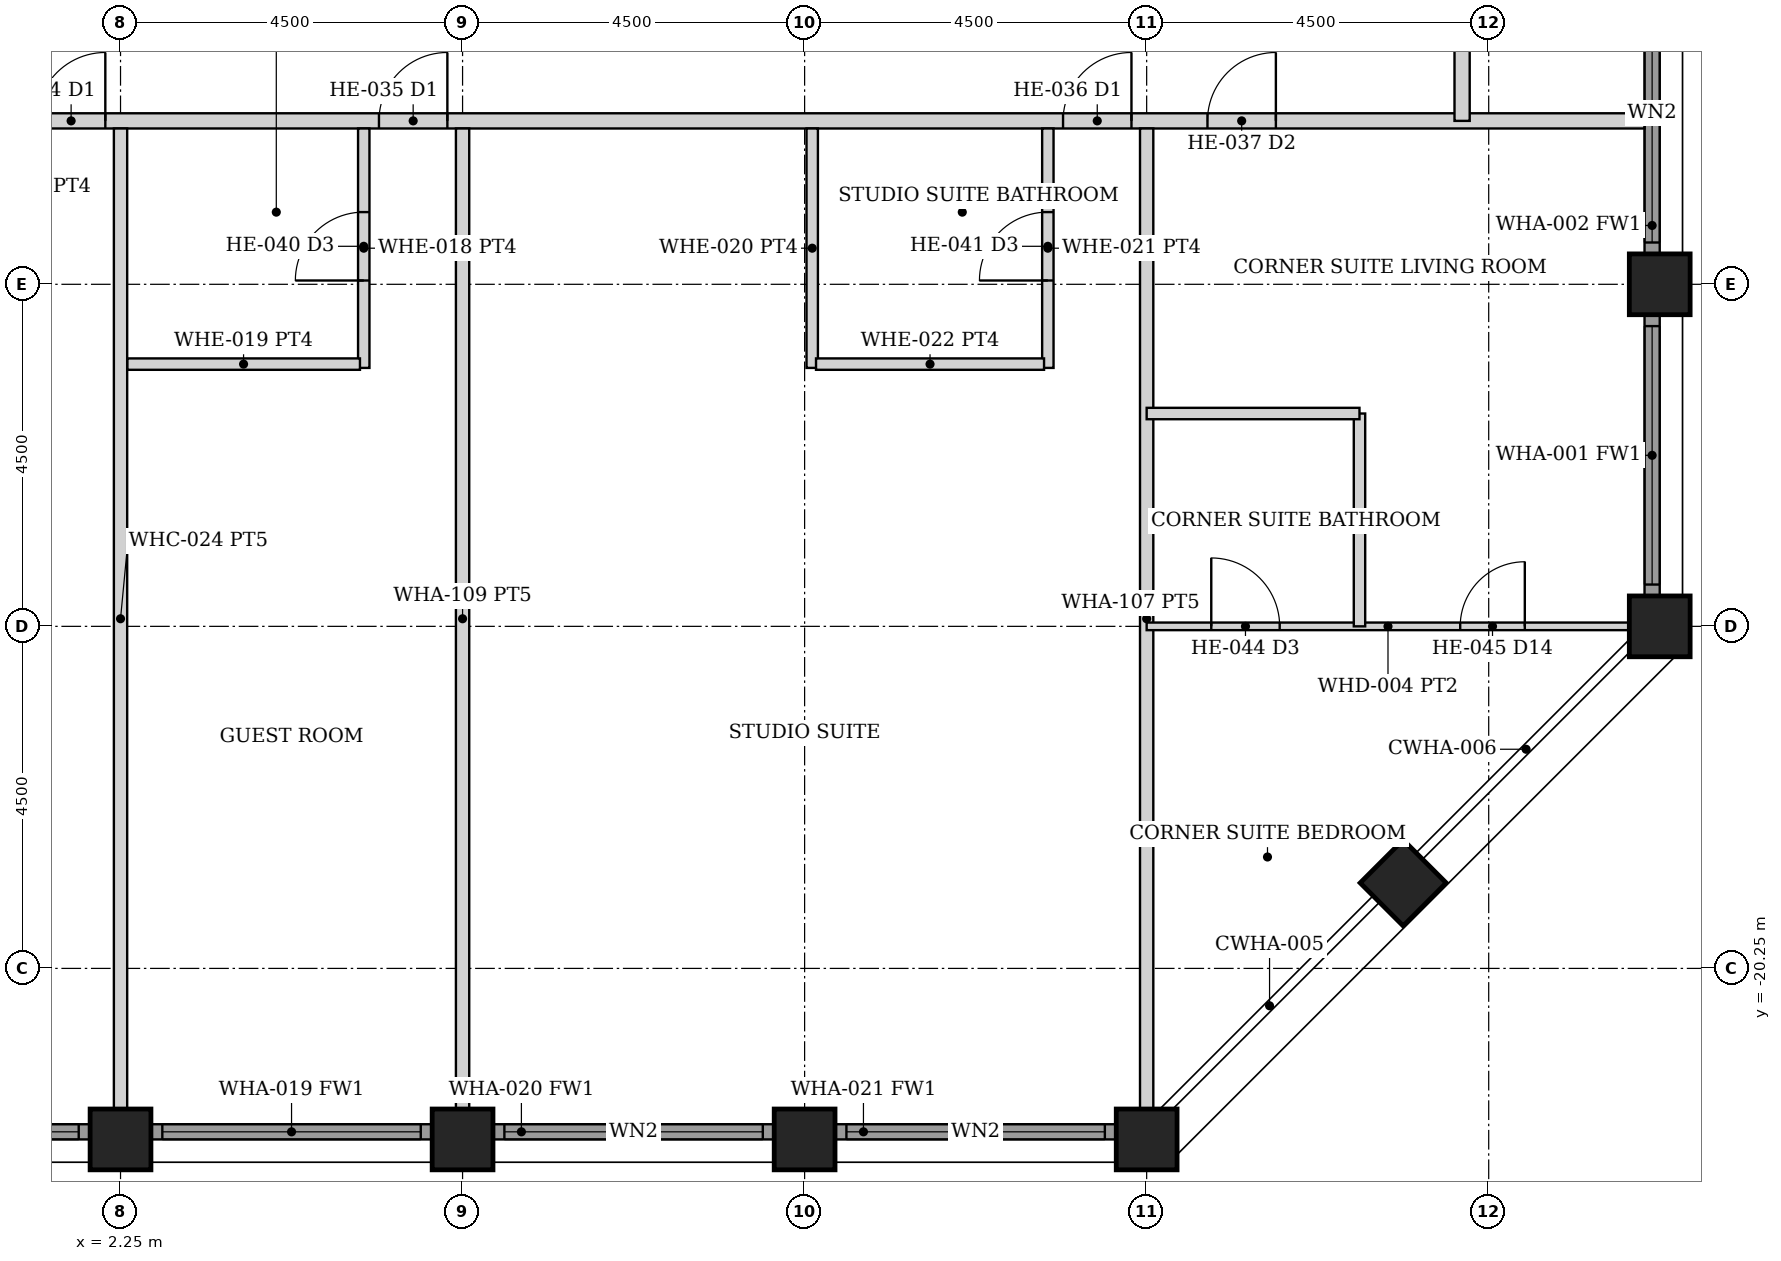
"""IFC4 building model, lengths in metres.
Left out: names, types, materials, properties, quantities, classifications, styles, units other than length and angle.
Written with IfcOpenShell. Run it as: python <this file> out.ifc"""

import sys

from ifc_helpers import new_model, si_unit, direction, frame, frame_2d, origin, origin_2d, place, context, subcontext, project, spatial, rectangle, hollow_rectangle, extrude, element, fill, save


model = new_model("IFC4")
c1 = context("Model", 3, precision=1e-05, world=origin(), true_north=direction((0.0, 1.0)))
c2 = subcontext(c1, "Body", "Model", "MODEL_VIEW")
j1 = project(units=[si_unit("LENGTHUNIT", "METRE"), si_unit("PLANEANGLEUNIT", "RADIAN")], contexts=[c1])
p1 = place(None, origin())
s1 = spatial("IfcSite", under=j1, at=p1, CompositionType="ELEMENT")
p2 = place(p1, origin())
s2 = spatial("IfcBuilding", under=s1, at=p2, CompositionType="ELEMENT")
p3 = place(p2, frame((0.0, 0.0, 161.6)))
s3 = spatial("IfcBuildingStorey", under=s2, at=p3, CompositionType="ELEMENT", Elevation=161.6)
for number, where, z_axis, x_axis in (
    (1, (22.5, -15.75, 0.0), (0.0, 0.0, 1.0), (1.0, 0.0, 0.0)),
    (2, (22.5, -11.25, 0.0), (0.0, 0.0, 1.0), (1.0, 0.0, 0.0)),
    (3, (2.25, -22.5, 0.0), (0.0, 0.0, 1.0), (0.0, 1.0, 0.0)),
    (4, (6.75, -22.5, 0.0), (0.0, 0.0, 1.0), (0.0, 1.0, 0.0)),
    (5, (11.25, -22.5, 0.0), (0.0, 0.0, 1.0), (0.0, 1.0, 0.0)),
    (6, (15.75, -22.5, 0.0), (0.0, 0.0, 1.0), (0.0, 1.0, 0.0)),
    (7, (19.125, -19.125, 0.0), (0.0, 0.0, 1.0), (0.707, -0.707, 0.0)),
):
    element("IfcColumn", number, at=place(p3, frame(where, z_axis=z_axis, x_axis=x_axis)), inside=s3, PredefinedType="COLUMN", context=c2, shape_type="SweptSolid", body=[
        extrude(hollow_rectangle(XDim=0.8, YDim=0.8, WallThickness=0.05, at=origin_2d()), origin(), (0.0, 0.0, 1.0), 3.6),
    ])
p4 = place(p3, frame((-1.845, -22.4, 0.0), z_axis=(0.0, 0.0, 1.0), x_axis=(1.0, 0.0, 0.0)))
e8 = element("IfcWall", 8, at=p4, inside=s3, PredefinedType="SOLIDWALL", context=c2, shape_type="SweptSolid", body=[
    extrude(rectangle(XDim=3.69, YDim=0.2, at=frame_2d((1.845, 0.0))), origin(), (0.0, 0.0, 1.0), 2.479),
])
p5 = place(p4, frame((0.145, 0.0, 0.3)))
e9 = element("IfcOpeningElement", 9, at=p5, cuts=e8, PredefinedType="OPENING", context=c2, shape_type="SweptSolid", body=[
    extrude(rectangle(XDim=3.4, YDim=2.029, at=frame_2d((1.7, 1.015))), frame((0.0, 0.11, 0.0), z_axis=(0.0, -1.0, 0.0), x_axis=(1.0, 0.0, 0.0)), (0.0, 0.0, 1.0), 0.22),
])
p6 = place(p3, frame((2.655, -22.4, 0.0), z_axis=(0.0, 0.0, 1.0), x_axis=(1.0, 0.0, 0.0)))
e10 = element("IfcWall", 10, at=p6, inside=s3, PredefinedType="SOLIDWALL", context=c2, shape_type="SweptSolid", body=[
    extrude(rectangle(XDim=3.69, YDim=0.2, at=frame_2d((1.845, 0.0))), origin(), (0.0, 0.0, 1.0), 2.479),
])
p7 = place(p6, frame((0.145, 0.0, 0.3)))
e11 = element("IfcOpeningElement", 11, at=p7, cuts=e10, PredefinedType="OPENING", context=c2, shape_type="SweptSolid", body=[
    extrude(rectangle(XDim=3.4, YDim=2.029, at=frame_2d((1.7, 1.015))), frame((0.0, 0.11, 0.0), z_axis=(0.0, -1.0, 0.0), x_axis=(1.0, 0.0, 0.0)), (0.0, 0.0, 1.0), 0.22),
])
p8 = place(p3, frame((7.155, -22.4, 0.0), z_axis=(0.0, 0.0, 1.0), x_axis=(1.0, 0.0, 0.0)))
e12 = element("IfcWall", 12, at=p8, inside=s3, PredefinedType="SOLIDWALL", context=c2, shape_type="SweptSolid", body=[
    extrude(rectangle(XDim=3.69, YDim=0.2, at=frame_2d((1.845, 0.0))), origin(), (0.0, 0.0, 1.0), 2.479),
])
p9 = place(p8, frame((0.145, 0.0, 0.3)))
e13 = element("IfcOpeningElement", 13, at=p9, cuts=e12, PredefinedType="OPENING", context=c2, shape_type="SweptSolid", body=[
    extrude(rectangle(XDim=3.4, YDim=2.029, at=frame_2d((1.7, 1.015))), frame((0.0, 0.11, 0.0), z_axis=(0.0, -1.0, 0.0), x_axis=(1.0, 0.0, 0.0)), (0.0, 0.0, 1.0), 0.22),
])
p10 = place(p3, frame((11.655, -22.4, 0.0), z_axis=(0.0, 0.0, 1.0), x_axis=(1.0, 0.0, 0.0)))
e14 = element("IfcWall", 14, at=p10, inside=s3, PredefinedType="SOLIDWALL", context=c2, shape_type="SweptSolid", body=[
    extrude(rectangle(XDim=3.69, YDim=0.2, at=frame_2d((1.845, 0.0))), origin(), (0.0, 0.0, 1.0), 2.479),
])
p11 = place(p10, frame((0.145, 0.0, 0.3)))
e15 = element("IfcOpeningElement", 15, at=p11, cuts=e14, PredefinedType="OPENING", context=c2, shape_type="SweptSolid", body=[
    extrude(rectangle(XDim=3.4, YDim=2.029, at=frame_2d((1.7, 1.015))), frame((0.0, 0.11, 0.0), z_axis=(0.0, -1.0, 0.0), x_axis=(1.0, 0.0, 0.0)), (0.0, 0.0, 1.0), 0.22),
])
p12 = place(p3, frame((22.4, -15.345, 0.0), z_axis=(0.0, 0.0, 1.0), x_axis=(0.0, 1.0, 0.0)))
e16 = element("IfcWall", 16, at=p12, inside=s3, PredefinedType="SOLIDWALL", context=c2, shape_type="SweptSolid", body=[
    extrude(rectangle(XDim=3.69, YDim=0.2, at=frame_2d((1.845, 0.0))), origin(), (0.0, 0.0, 1.0), 2.479),
])
p13 = place(p12, frame((0.145, 0.0, 0.3)))
e17 = element("IfcOpeningElement", 17, at=p13, cuts=e16, PredefinedType="OPENING", context=c2, shape_type="SweptSolid", body=[
    extrude(rectangle(XDim=3.4, YDim=2.029, at=frame_2d((1.7, 1.015))), frame((0.0, 0.11, 0.0), z_axis=(0.0, -1.0, 0.0), x_axis=(1.0, 0.0, 0.0)), (0.0, 0.0, 1.0), 0.22),
])
p14 = place(p3, frame((22.4, -10.845, 0.0), z_axis=(0.0, 0.0, 1.0), x_axis=(0.0, 1.0, 0.0)))
e18 = element("IfcWall", 18, at=p14, inside=s3, PredefinedType="SOLIDWALL", context=c2, shape_type="SweptSolid", body=[
    extrude(rectangle(XDim=3.69, YDim=0.2, at=frame_2d((1.845, 0.0))), origin(), (0.0, 0.0, 1.0), 2.479),
])
p15 = place(p14, frame((0.145, 0.0, 0.3)))
e19 = element("IfcOpeningElement", 19, at=p15, cuts=e18, PredefinedType="OPENING", context=c2, shape_type="SweptSolid", body=[
    extrude(rectangle(XDim=3.4, YDim=2.029, at=frame_2d((1.7, 1.015))), frame((0.0, 0.11, 0.0), z_axis=(0.0, -1.0, 0.0), x_axis=(1.0, 0.0, 0.0)), (0.0, 0.0, 1.0), 0.22),
])
p16 = place(p3, frame((-22.3, -9.1, 0.0), z_axis=(0.0, 0.0, 1.0), x_axis=(1.0, 0.0, 0.0)))
e20 = element("IfcWall", 20, at=p16, inside=s3, PredefinedType="PARTITIONING", context=c2, shape_type="SweptSolid", body=[
    extrude(rectangle(XDim=44.6, YDim=0.2, at=frame_2d((22.3, 0.0))), origin(), (0.0, 0.0, 1.0), 2.473),
])
p17 = place(p16, frame((6.75, 0.0, 0.0)))
e21 = element("IfcOpeningElement", 21, at=p17, cuts=e20, PredefinedType="OPENING", context=c2, shape_type="SweptSolid", body=[
    extrude(rectangle(XDim=0.9, YDim=2.1, at=frame_2d((0.45, 1.05))), frame((0.0, 0.11, 0.0), z_axis=(0.0, -1.0, 0.0), x_axis=(1.0, 0.0, 0.0)), (0.0, 0.0, 1.0), 0.22),
])
p18 = place(p16, frame((23.45, 0.0, 0.0)))
e22 = element("IfcOpeningElement", 22, at=p18, cuts=e20, PredefinedType="OPENING", context=c2, shape_type="SweptSolid", body=[
    extrude(rectangle(XDim=0.9, YDim=2.1, at=frame_2d((0.45, 1.05))), frame((0.0, 0.11, 0.0), z_axis=(0.0, -1.0, 0.0), x_axis=(1.0, 0.0, 0.0)), (0.0, 0.0, 1.0), 0.22),
])
p19 = place(p16, frame((27.95, 0.0, 0.0)))
e23 = element("IfcOpeningElement", 23, at=p19, cuts=e20, PredefinedType="OPENING", context=c2, shape_type="SweptSolid", body=[
    extrude(rectangle(XDim=0.9, YDim=2.1, at=frame_2d((0.45, 1.05))), frame((0.0, 0.11, 0.0), z_axis=(0.0, -1.0, 0.0), x_axis=(1.0, 0.0, 0.0)), (0.0, 0.0, 1.0), 0.22),
])
p20 = place(p16, frame((36.95, 0.0, 0.0)))
e24 = element("IfcOpeningElement", 24, at=p20, cuts=e20, PredefinedType="OPENING", context=c2, shape_type="SweptSolid", body=[
    extrude(rectangle(XDim=0.9, YDim=2.1, at=frame_2d((0.45, 1.05))), frame((0.0, 0.11, 0.0), z_axis=(0.0, -1.0, 0.0), x_axis=(1.0, 0.0, 0.0)), (0.0, 0.0, 1.0), 0.22),
])
p21 = place(p16, frame((38.85, 0.0, 0.0)))
e25 = element("IfcOpeningElement", 25, at=p21, cuts=e20, PredefinedType="OPENING", context=c2, shape_type="SweptSolid", body=[
    extrude(rectangle(XDim=0.9, YDim=2.1, at=frame_2d((0.45, 1.05))), frame((0.0, 0.11, 0.0), z_axis=(0.0, -1.0, 0.0), x_axis=(1.0, 0.0, 0.0)), (0.0, 0.0, 1.0), 0.22),
])
p22 = place(p16, frame((4.85, 0.0, 0.0)))
e26 = element("IfcOpeningElement", 26, at=p22, cuts=e20, PredefinedType="OPENING", context=c2, shape_type="SweptSolid", body=[
    extrude(rectangle(XDim=0.9, YDim=2.1, at=frame_2d((0.45, 1.05))), frame((0.0, 0.11, 0.0), z_axis=(0.0, -1.0, 0.0), x_axis=(1.0, 0.0, 0.0)), (0.0, 0.0, 1.0), 0.22),
])
p23 = place(p3, frame((19.9, -9.1, 0.0), z_axis=(0.0, 0.0, 1.0), x_axis=(0.0, 1.0, 0.0)))
e27 = element("IfcWall", 27, at=p23, inside=s3, PredefinedType="PARTITIONING", context=c2, shape_type="SweptSolid", body=[
    extrude(rectangle(XDim=18.2, YDim=0.2, at=frame_2d((9.1, 0.0))), origin(), (0.0, 0.0, 1.0), 2.473),
])
p24 = place(p23, frame((8.425, 0.0, 0.0)))
e28 = element("IfcOpeningElement", 28, at=p24, cuts=e27, PredefinedType="OPENING", context=c2, shape_type="SweptSolid", body=[
    extrude(rectangle(XDim=1.35, YDim=2.1, at=frame_2d((0.675, 1.05))), frame((0.0, 0.11, 0.0), z_axis=(0.0, -1.0, 0.0), x_axis=(1.0, 0.0, 0.0)), (0.0, 0.0, 1.0), 0.22),
])
p25 = place(p3, frame((5.45, -12.35, 0.0), z_axis=(0.0, 0.0, 1.0), x_axis=(0.0, 1.0, 0.0)))
e29 = element("IfcWall", 29, at=p25, inside=s3, PredefinedType="PARTITIONING", context=c2, shape_type="SweptSolid", body=[
    extrude(rectangle(XDim=3.15, YDim=0.15, at=frame_2d((1.575, 0.0))), origin(), (0.0, 0.0, 1.0), 2.473),
])
p26 = place(p25, frame((1.15, 0.0, 0.0)))
e30 = element("IfcOpeningElement", 30, at=p26, cuts=e29, PredefinedType="OPENING", context=c2, shape_type="SweptSolid", body=[
    extrude(rectangle(XDim=0.9, YDim=2.1, at=frame_2d((0.45, 1.05))), frame((0.0, 0.085, 0.0), z_axis=(0.0, -1.0, 0.0), x_axis=(1.0, 0.0, 0.0)), (0.0, 0.0, 1.0), 0.17),
])
p27 = place(p3, frame((2.337, -12.3, 0.0), z_axis=(0.0, 0.0, 1.0), x_axis=(1.0, 0.0, 0.0)))
e31 = element("IfcWall", 31, at=p27, inside=s3, PredefinedType="PARTITIONING", context=c2, shape_type="SweptSolid", body=[
    extrude(rectangle(XDim=3.062, YDim=0.15, at=frame_2d((1.531, 0.0))), origin(), (0.0, 0.0, 1.0), 2.473),
])
p28 = place(p3, frame((14.45, -12.35, 0.0), z_axis=(0.0, 0.0, 1.0), x_axis=(0.0, 1.0, 0.0)))
e32 = element("IfcWall", 32, at=p28, inside=s3, PredefinedType="PARTITIONING", context=c2, shape_type="SweptSolid", body=[
    extrude(rectangle(XDim=3.15, YDim=0.15, at=frame_2d((1.575, 0.0))), origin(), (0.0, 0.0, 1.0), 2.473),
])
p29 = place(p28, frame((1.15, 0.0, 0.0)))
e33 = element("IfcOpeningElement", 33, at=p29, cuts=e32, PredefinedType="OPENING", context=c2, shape_type="SweptSolid", body=[
    extrude(rectangle(XDim=0.9, YDim=2.1, at=frame_2d((0.45, 1.05))), frame((0.0, 0.085, 0.0), z_axis=(0.0, -1.0, 0.0), x_axis=(1.0, 0.0, 0.0)), (0.0, 0.0, 1.0), 0.17),
])
p30 = place(p3, frame((11.35, -12.35, 0.0), z_axis=(0.0, 0.0, 1.0), x_axis=(0.0, 1.0, 0.0)))
e34 = element("IfcWall", 34, at=p30, inside=s3, PredefinedType="PARTITIONING", context=c2, shape_type="SweptSolid", body=[
    extrude(rectangle(XDim=3.15, YDim=0.15, at=frame_2d((1.575, 0.0))), origin(), (0.0, 0.0, 1.0), 2.473),
])
p31 = place(p3, frame((11.4, -12.3, 0.0), z_axis=(0.0, 0.0, 1.0), x_axis=(1.0, 0.0, 0.0)))
e35 = element("IfcWall", 35, at=p31, inside=s3, PredefinedType="PARTITIONING", context=c2, shape_type="SweptSolid", body=[
    extrude(rectangle(XDim=3.0, YDim=0.15, at=frame_2d((1.5, 0.0))), origin(), (0.0, 0.0, 1.0), 2.473),
])
for number, where, z_axis, x_axis in (
    (36, (2.25, -22.1, 0.0), (0.0, 0.0, 1.0), (0.0, 1.0, 0.0)),
    (37, (6.75, -22.1, 0.0), (0.0, 0.0, 1.0), (0.0, 1.0, 0.0)),
    (38, (15.75, -22.1, 0.0), (0.0, 0.0, 1.0), (0.0, 1.0, 0.0)),
):
    element("IfcWall", number, at=place(p3, frame(where, z_axis=z_axis, x_axis=x_axis)), inside=s3, PredefinedType="PARTITIONING", context=c2, shape_type="SweptSolid", body=[
        extrude(rectangle(XDim=12.9, YDim=0.175, at=frame_2d((6.45, 0.0))), origin(), (0.0, 0.0, 1.0), 2.473),
    ])
p32 = place(p3, frame((15.75, -15.75, 0.0), z_axis=(0.0, 0.0, 1.0), x_axis=(1.0, 0.0, 0.0)))
e39 = element("IfcWall", 39, at=p32, inside=s3, PredefinedType="PARTITIONING", context=c2, shape_type="SweptSolid", body=[
    extrude(rectangle(XDim=6.35, YDim=0.1, at=frame_2d((3.175, 0.0))), origin(), (0.0, 0.0, 1.0), 2.473),
])
p33 = place(p32, frame((4.125, 0.0, 0.0)))
e40 = element("IfcOpeningElement", 40, at=p33, cuts=e39, PredefinedType="OPENING", context=c2, shape_type="SweptSolid", body=[
    extrude(rectangle(XDim=0.85, YDim=2.1, at=frame_2d((0.425, 1.05))), frame((0.0, 0.06, 0.0), z_axis=(0.0, -1.0, 0.0), x_axis=(1.0, 0.0, 0.0)), (0.0, 0.0, 1.0), 0.12),
])
p34 = place(p32, frame((0.85, 0.0, 0.0)))
e41 = element("IfcOpeningElement", 41, at=p34, cuts=e39, PredefinedType="OPENING", context=c2, shape_type="SweptSolid", body=[
    extrude(rectangle(XDim=0.9, YDim=2.1, at=frame_2d((0.45, 1.05))), frame((0.0, 0.06, 0.0), z_axis=(0.0, -1.0, 0.0), x_axis=(1.0, 0.0, 0.0)), (0.0, 0.0, 1.0), 0.12),
])
for number, where, z_axis, x_axis in (
    (42, (18.55, -15.75, 0.0), (0.0, 0.0, 1.0), (0.0, 1.0, 0.0)),
    (43, (15.75, -12.95, 0.0), (0.0, 0.0, 1.0), (1.0, 0.0, 0.0)),
):
    element("IfcWall", number, at=place(p3, frame(where, z_axis=z_axis, x_axis=x_axis)), inside=s3, PredefinedType="PARTITIONING", context=c2, shape_type="SweptSolid", body=[
        extrude(rectangle(XDim=2.8, YDim=0.15, at=frame_2d((1.4, 0.0))), origin(), (0.0, 0.0, 1.0), 2.473),
    ])
p35 = place(p5, origin())
e44 = element("IfcWindow", 44, at=p35, inside=s3, PartitioningType="SINGLE_PANEL", PredefinedType="WINDOW", context=c2, shape_type="SweptSolid", body=[
    extrude(rectangle(XDim=3.4, YDim=2.029, at=frame_2d((1.7, 1.015))), frame((0.0, 0.03, 0.0), z_axis=(0.0, -1.0, 0.0), x_axis=(1.0, 0.0, 0.0)), (0.0, 0.0, 1.0), 0.06),
])
fill(e9, e44)
p36 = place(p7, origin())
e45 = element("IfcWindow", 45, at=p36, inside=s3, PartitioningType="SINGLE_PANEL", PredefinedType="WINDOW", context=c2, shape_type="SweptSolid", body=[
    extrude(rectangle(XDim=3.4, YDim=2.029, at=frame_2d((1.7, 1.015))), frame((0.0, 0.03, 0.0), z_axis=(0.0, -1.0, 0.0), x_axis=(1.0, 0.0, 0.0)), (0.0, 0.0, 1.0), 0.06),
])
fill(e11, e45)
p37 = place(p9, origin())
e46 = element("IfcWindow", 46, at=p37, inside=s3, PartitioningType="SINGLE_PANEL", PredefinedType="WINDOW", context=c2, shape_type="SweptSolid", body=[
    extrude(rectangle(XDim=3.4, YDim=2.029, at=frame_2d((1.7, 1.015))), frame((0.0, 0.03, 0.0), z_axis=(0.0, -1.0, 0.0), x_axis=(1.0, 0.0, 0.0)), (0.0, 0.0, 1.0), 0.06),
])
fill(e13, e46)
p38 = place(p11, origin())
e47 = element("IfcWindow", 47, at=p38, inside=s3, PartitioningType="SINGLE_PANEL", PredefinedType="WINDOW", context=c2, shape_type="SweptSolid", body=[
    extrude(rectangle(XDim=3.4, YDim=2.029, at=frame_2d((1.7, 1.015))), frame((0.0, 0.03, 0.0), z_axis=(0.0, -1.0, 0.0), x_axis=(1.0, 0.0, 0.0)), (0.0, 0.0, 1.0), 0.06),
])
fill(e15, e47)
p39 = place(p13, origin())
e48 = element("IfcWindow", 48, at=p39, inside=s3, PartitioningType="SINGLE_PANEL", PredefinedType="WINDOW", context=c2, shape_type="SweptSolid", body=[
    extrude(rectangle(XDim=3.4, YDim=2.029, at=frame_2d((1.7, 1.015))), frame((0.0, 0.03, 0.0), z_axis=(0.0, -1.0, 0.0), x_axis=(1.0, 0.0, 0.0)), (0.0, 0.0, 1.0), 0.06),
])
fill(e17, e48)
p40 = place(p15, origin())
e49 = element("IfcWindow", 49, at=p40, inside=s3, PartitioningType="SINGLE_PANEL", PredefinedType="WINDOW", context=c2, shape_type="SweptSolid", body=[
    extrude(rectangle(XDim=3.4, YDim=2.029, at=frame_2d((1.7, 1.015))), frame((0.0, 0.03, 0.0), z_axis=(0.0, -1.0, 0.0), x_axis=(1.0, 0.0, 0.0)), (0.0, 0.0, 1.0), 0.06),
])
fill(e19, e49)
p41 = place(p18, origin())
e50 = element("IfcDoor", 50, at=p41, inside=s3, OperationType="SINGLE_SWING_RIGHT", PredefinedType="DOOR", context=c2, shape_type="SweptSolid", body=[
    extrude(rectangle(XDim=0.9, YDim=2.1, at=frame_2d((0.45, 1.05))), frame((0.0, 0.025, 0.0), z_axis=(0.0, -1.0, 0.0), x_axis=(1.0, 0.0, 0.0)), (0.0, 0.0, 1.0), 0.05),
])
fill(e22, e50)
p42 = place(p19, origin())
e51 = element("IfcDoor", 51, at=p42, inside=s3, OperationType="SINGLE_SWING_RIGHT", PredefinedType="DOOR", context=c2, shape_type="SweptSolid", body=[
    extrude(rectangle(XDim=0.9, YDim=2.1, at=frame_2d((0.45, 1.05))), frame((0.0, 0.025, 0.0), z_axis=(0.0, -1.0, 0.0), x_axis=(1.0, 0.0, 0.0)), (0.0, 0.0, 1.0), 0.05),
])
fill(e23, e51)
p43 = place(p26, origin())
e52 = element("IfcDoor", 52, at=p43, inside=s3, OperationType="SINGLE_SWING_LEFT", PredefinedType="DOOR", context=c2, shape_type="SweptSolid", body=[
    extrude(rectangle(XDim=0.9, YDim=2.1, at=frame_2d((0.45, 1.05))), frame((0.0, 0.025, 0.0), z_axis=(0.0, -1.0, 0.0), x_axis=(1.0, 0.0, 0.0)), (0.0, 0.0, 1.0), 0.05),
])
fill(e30, e52)
p44 = place(p20, origin())
e53 = element("IfcDoor", 53, at=p44, inside=s3, OperationType="SINGLE_SWING_RIGHT", PredefinedType="DOOR", context=c2, shape_type="SweptSolid", body=[
    extrude(rectangle(XDim=0.9, YDim=2.1, at=frame_2d((0.45, 1.05))), frame((0.0, 0.025, 0.0), z_axis=(0.0, -1.0, 0.0), x_axis=(1.0, 0.0, 0.0)), (0.0, 0.0, 1.0), 0.05),
])
fill(e24, e53)
p45 = place(p29, origin())
e54 = element("IfcDoor", 54, at=p45, inside=s3, OperationType="SINGLE_SWING_LEFT", PredefinedType="DOOR", context=c2, shape_type="SweptSolid", body=[
    extrude(rectangle(XDim=0.9, YDim=2.1, at=frame_2d((0.45, 1.05))), frame((0.0, 0.025, 0.0), z_axis=(0.0, -1.0, 0.0), x_axis=(1.0, 0.0, 0.0)), (0.0, 0.0, 1.0), 0.05),
])
fill(e33, e54)
p46 = place(p21, origin())
e55 = element("IfcDoor", 55, at=p46, inside=s3, OperationType="SINGLE_SWING_RIGHT", PredefinedType="DOOR", context=c2, shape_type="SweptSolid", body=[
    extrude(rectangle(XDim=0.9, YDim=2.1, at=frame_2d((0.45, 1.05))), frame((0.0, 0.025, 0.0), z_axis=(0.0, -1.0, 0.0), x_axis=(1.0, 0.0, 0.0)), (0.0, 0.0, 1.0), 0.05),
])
fill(e25, e55)
p47 = place(p33, origin())
e56 = element("IfcDoor", 56, at=p47, inside=s3, OperationType="SINGLE_SWING_RIGHT", PredefinedType="DOOR", context=c2, shape_type="SweptSolid", body=[
    extrude(rectangle(XDim=0.85, YDim=2.1, at=frame_2d((0.425, 1.05))), frame((0.0, 0.025, 0.0), z_axis=(0.0, -1.0, 0.0), x_axis=(1.0, 0.0, 0.0)), (0.0, 0.0, 1.0), 0.05),
])
fill(e40, e56)
p48 = place(p34, origin())
e57 = element("IfcDoor", 57, at=p48, inside=s3, OperationType="SINGLE_SWING_LEFT", PredefinedType="DOOR", context=c2, shape_type="SweptSolid", body=[
    extrude(rectangle(XDim=0.9, YDim=2.1, at=frame_2d((0.45, 1.05))), frame((0.0, 0.025, 0.0), z_axis=(0.0, -1.0, 0.0), x_axis=(1.0, 0.0, 0.0)), (0.0, 0.0, 1.0), 0.05),
])
fill(e41, e57)
save(model, sys.argv[1])
